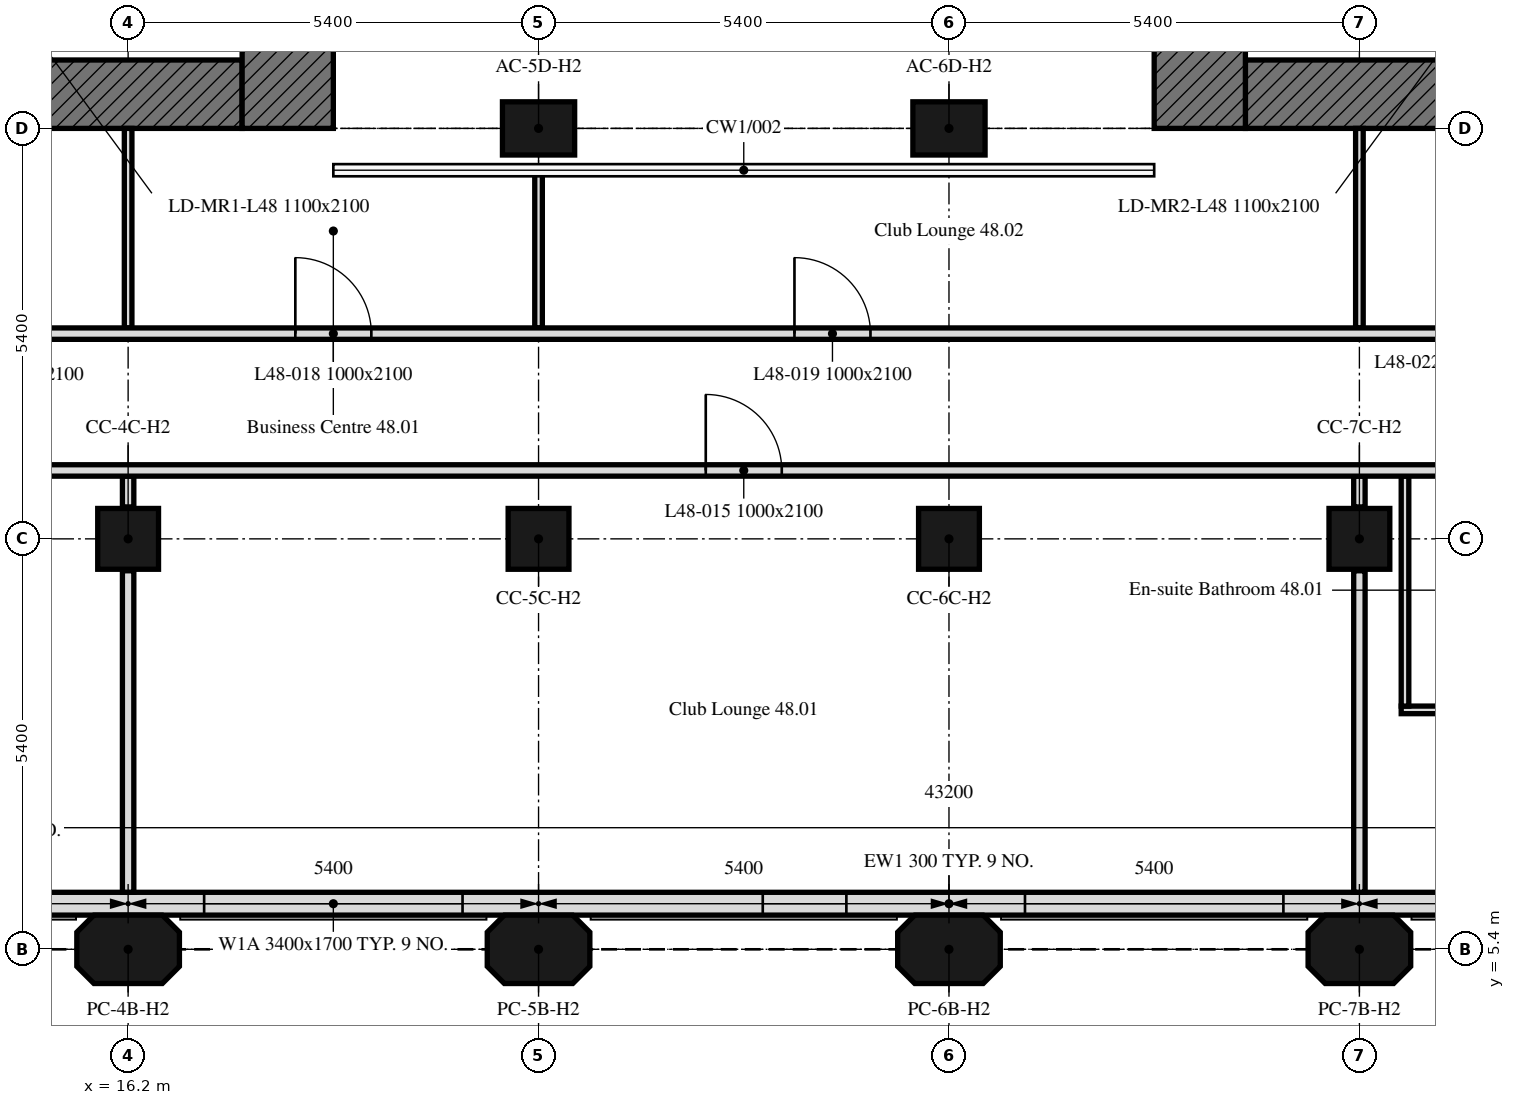
"""IFC4 building model, lengths in metres.
Left out: names, types, materials, properties, quantities, classifications, styles, units other than length and angle.
Written with IfcOpenShell. Run it as: python <this file> out.ifc"""

import sys

from ifc_helpers import new_model, si_unit, direction, frame, frame_2d, origin, origin_2d, place, context, subcontext, project, spatial, polyline, rectangle, outline, extrude, element, fill, save


model = new_model("IFC4")
c1 = context("Model", 3, precision=1e-05, world=origin(), true_north=direction((0.0, 1.0)))
c2 = subcontext(c1, "Body", "Model", "MODEL_VIEW")
j1 = project(units=[si_unit("LENGTHUNIT", "METRE"), si_unit("PLANEANGLEUNIT", "RADIAN")], contexts=[c1])
p1 = place(None, origin())
s1 = spatial("IfcSite", under=j1, at=p1, CompositionType="ELEMENT")
p2 = place(p1, origin())
s2 = spatial("IfcBuilding", under=s1, at=p2, CompositionType="ELEMENT")
p3 = place(p2, frame((0.0, 0.0, 197.2)))
s3 = spatial("IfcBuildingStorey", under=s2, at=p3, CompositionType="ELEMENT", Elevation=197.2)
for number, where, z_axis, x_axis in (
    (1, (16.2, 5.4, 0.0), (0.0, 0.0, 1.0), (1.0, 0.0, 0.0)),
    (2, (21.6, 5.4, 0.0), (0.0, 0.0, 1.0), (1.0, 0.0, 0.0)),
    (3, (27.0, 5.4, 0.0), (0.0, 0.0, 1.0), (1.0, 0.0, 0.0)),
    (4, (32.4, 5.4, 0.0), (0.0, 0.0, 1.0), (1.0, 0.0, 0.0)),
):
    element("IfcColumn", number, at=place(p3, frame(where, z_axis=z_axis, x_axis=x_axis)), inside=s3, PredefinedType="COLUMN", context=c2, shape_type="SweptSolid", body=[
        extrude(outline(polyline([(-0.45, -0.45), (0.45, -0.45), (0.675, -0.225), (0.675, 0.225), (0.45, 0.45), (-0.45, 0.45), (-0.675, 0.225), (-0.675, -0.225), (-0.45, -0.45)])), origin(), (0.0, 0.0, 1.0), 3.0),
    ])
for number, where, z_axis, x_axis in (
    (5, (16.2, 10.8, 0.0), (0.0, 0.0, 1.0), (1.0, 0.0, 0.0)),
    (6, (21.6, 10.8, 0.0), (0.0, 0.0, 1.0), (1.0, 0.0, 0.0)),
    (7, (27.0, 10.8, 0.0), (0.0, 0.0, 1.0), (1.0, 0.0, 0.0)),
    (8, (32.4, 10.8, 0.0), (0.0, 0.0, 1.0), (1.0, 0.0, 0.0)),
):
    element("IfcColumn", number, at=place(p3, frame(where, z_axis=z_axis, x_axis=x_axis)), inside=s3, PredefinedType="COLUMN", context=c2, shape_type="SweptSolid", body=[
        extrude(rectangle(XDim=0.8, YDim=0.8, at=origin_2d()), origin(), (0.0, 0.0, 1.0), 3.0),
    ])
for number, where, z_axis, x_axis in (
    (9, (21.6, 16.2, 0.0), (0.0, 0.0, 1.0), (1.0, 0.0, 0.0)),
    (10, (27.0, 16.2, 0.0), (0.0, 0.0, 1.0), (1.0, 0.0, 0.0)),
):
    element("IfcColumn", number, at=place(p3, frame(where, z_axis=z_axis, x_axis=x_axis)), inside=s3, PredefinedType="COLUMN", context=c2, shape_type="SweptSolid", body=[
        extrude(rectangle(XDim=0.95, YDim=0.7, at=origin_2d()), origin(), (0.0, 0.0, 1.0), 3.0),
    ])
p4 = place(p3, frame((10.986, 6.0, 0.0), z_axis=(0.0, 0.0, 1.0), x_axis=(1.0, 0.0, 0.0)))
e11 = element("IfcWall", 11, at=p4, inside=s3, PredefinedType="SOLIDWALL", context=c2, shape_type="SweptSolid", body=[
    extrude(rectangle(XDim=32.027, YDim=0.3, at=frame_2d((16.014, 0.0))), origin(), (0.0, 0.0, 1.0), 3.0),
])
p5 = place(p4, frame((2.764, 0.0, 0.9)))
e12 = element("IfcOpeningElement", 12, at=p5, cuts=e11, PredefinedType="OPENING", context=c2, shape_type="SweptSolid", body=[
    extrude(rectangle(XDim=1.1, YDim=1.7, at=frame_2d((0.55, 0.85))), frame((0.0, 0.16, 0.0), z_axis=(0.0, -1.0, 0.0), x_axis=(1.0, 0.0, 0.0)), (0.0, 0.0, 1.0), 0.32),
])
p6 = place(p4, frame((6.214, 0.0, 0.9)))
e13 = element("IfcOpeningElement", 13, at=p6, cuts=e11, PredefinedType="OPENING", context=c2, shape_type="SweptSolid", body=[
    extrude(rectangle(XDim=3.4, YDim=1.7, at=frame_2d((1.7, 0.85))), frame((0.0, 0.16, 0.0), z_axis=(0.0, -1.0, 0.0), x_axis=(1.0, 0.0, 0.0)), (0.0, 0.0, 1.0), 0.32),
])
p7 = place(p4, frame((13.564, 0.0, 0.9)))
e14 = element("IfcOpeningElement", 14, at=p7, cuts=e11, PredefinedType="OPENING", context=c2, shape_type="SweptSolid", body=[
    extrude(rectangle(XDim=1.1, YDim=1.7, at=frame_2d((0.55, 0.85))), frame((0.0, 0.16, 0.0), z_axis=(0.0, -1.0, 0.0), x_axis=(1.0, 0.0, 0.0)), (0.0, 0.0, 1.0), 0.32),
])
p8 = place(p4, frame((17.014, 0.0, 0.9)))
e15 = element("IfcOpeningElement", 15, at=p8, cuts=e11, PredefinedType="OPENING", context=c2, shape_type="SweptSolid", body=[
    extrude(rectangle(XDim=3.4, YDim=1.7, at=frame_2d((1.7, 0.85))), frame((0.0, 0.16, 0.0), z_axis=(0.0, -1.0, 0.0), x_axis=(1.0, 0.0, 0.0)), (0.0, 0.0, 1.0), 0.32),
])
p9 = place(p4, frame((24.364, 0.0, 0.9)))
e16 = element("IfcOpeningElement", 16, at=p9, cuts=e11, PredefinedType="OPENING", context=c2, shape_type="SweptSolid", body=[
    extrude(rectangle(XDim=1.1, YDim=1.7, at=frame_2d((0.55, 0.85))), frame((0.0, 0.16, 0.0), z_axis=(0.0, -1.0, 0.0), x_axis=(1.0, 0.0, 0.0)), (0.0, 0.0, 1.0), 0.32),
])
p10 = place(p4, frame((27.814, 0.0, 0.9)))
e17 = element("IfcOpeningElement", 17, at=p10, cuts=e11, PredefinedType="OPENING", context=c2, shape_type="SweptSolid", body=[
    extrude(rectangle(XDim=3.4, YDim=1.7, at=frame_2d((1.7, 0.85))), frame((0.0, 0.16, 0.0), z_axis=(0.0, -1.0, 0.0), x_axis=(1.0, 0.0, 0.0)), (0.0, 0.0, 1.0), 0.32),
])
p11 = place(p3, frame((17.7, 16.65, 0.0), z_axis=(0.0, 0.0, 1.0), x_axis=(-1.0, 0.0, 0.0)))
e18 = element("IfcWall", 18, at=p11, inside=s3, PredefinedType="SOLIDWALL", context=c2, shape_type="SweptSolid", body=[
    extrude(rectangle(XDim=11.1, YDim=0.9, at=frame_2d((5.55, 0.0))), origin(), (0.0, 0.0, 1.0), 3.0),
])
p12 = place(p11, frame((5.55, 0.0, 0.0)))
e19 = element("IfcOpeningElement", 19, at=p12, cuts=e18, PredefinedType="OPENING", context=c2, shape_type="SweptSolid", body=[
    extrude(rectangle(XDim=2.0, YDim=2.4, at=frame_2d((1.0, 1.2))), frame((0.0, 0.45, 0.0), z_axis=(0.0, -1.0, 0.0), x_axis=(1.0, 0.0, 0.0)), (0.0, 0.0, 1.0), 0.9),
])
p13 = place(p3, frame((18.3, 32.4, 0.0), z_axis=(0.0, 0.0, 1.0), x_axis=(0.0, -1.0, 0.0)))
e20 = element("IfcWall", 20, at=p13, inside=s3, PredefinedType="SOLIDWALL", context=c2, shape_type="SweptSolid", body=[
    extrude(rectangle(XDim=16.2, YDim=1.2, at=frame_2d((8.1, 0.0))), origin(), (0.0, 0.0, 1.0), 3.0),
])
p14 = place(p3, frame((42.0, 16.65, 0.0), z_axis=(0.0, 0.0, 1.0), x_axis=(-1.0, 0.0, 0.0)))
e21 = element("IfcWall", 21, at=p14, inside=s3, PredefinedType="SOLIDWALL", context=c2, shape_type="SweptSolid", body=[
    extrude(rectangle(XDim=11.1, YDim=0.9, at=frame_2d((5.55, 0.0))), origin(), (0.0, 0.0, 1.0), 3.0),
])
p15 = place(p14, frame((3.55, 0.0, 0.0)))
e22 = element("IfcOpeningElement", 22, at=p15, cuts=e21, PredefinedType="OPENING", context=c2, shape_type="SweptSolid", body=[
    extrude(rectangle(XDim=2.0, YDim=2.4, at=frame_2d((1.0, 1.2))), frame((0.0, 0.45, 0.0), z_axis=(0.0, -1.0, 0.0), x_axis=(1.0, 0.0, 0.0)), (0.0, 0.0, 1.0), 0.9),
])
p16 = place(p3, frame((30.3, 16.2, 0.0), z_axis=(0.0, 0.0, 1.0), x_axis=(0.0, 1.0, 0.0)))
e23 = element("IfcWall", 23, at=p16, inside=s3, PredefinedType="SOLIDWALL", context=c2, shape_type="SweptSolid", body=[
    extrude(rectangle(XDim=16.2, YDim=1.2, at=frame_2d((8.1, 0.0))), origin(), (0.0, 0.0, 1.0), 3.0),
])
p17 = place(p3, frame((16.2, 6.151, 0.0), z_axis=(0.0, 0.0, 1.0), x_axis=(0.0, 1.0, 0.0)))
e24 = element("IfcWall", 24, at=p17, inside=s3, PredefinedType="PARTITIONING", context=c2, shape_type="SweptSolid", body=[
    extrude(rectangle(XDim=4.229, YDim=0.15, at=frame_2d((2.115, 0.0))), origin(), (0.0, 0.0, 1.0), 3.0),
])
p18 = place(p3, frame((16.2, 11.22, 0.0), z_axis=(0.0, 0.0, 1.0), x_axis=(0.0, 1.0, 0.0)))
e25 = element("IfcWall", 25, at=p18, inside=s3, PredefinedType="PARTITIONING", context=c2, shape_type="SweptSolid", body=[
    extrude(rectangle(XDim=0.405, YDim=0.15, at=frame_2d((0.203, 0.0))), origin(), (0.0, 0.0, 1.0), 3.0),
])
p19 = place(p3, frame((32.4, 6.151, 0.0), z_axis=(0.0, 0.0, 1.0), x_axis=(0.0, 1.0, 0.0)))
e26 = element("IfcWall", 26, at=p19, inside=s3, PredefinedType="PARTITIONING", context=c2, shape_type="SweptSolid", body=[
    extrude(rectangle(XDim=4.229, YDim=0.15, at=frame_2d((2.115, 0.0))), origin(), (0.0, 0.0, 1.0), 3.0),
])
p20 = place(p3, frame((32.4, 11.22, 0.0), z_axis=(0.0, 0.0, 1.0), x_axis=(0.0, 1.0, 0.0)))
e27 = element("IfcWall", 27, at=p20, inside=s3, PredefinedType="PARTITIONING", context=c2, shape_type="SweptSolid", body=[
    extrude(rectangle(XDim=0.405, YDim=0.15, at=frame_2d((0.203, 0.0))), origin(), (0.0, 0.0, 1.0), 3.0),
])
p21 = place(p3, frame((35.05, 8.55, 0.0), z_axis=(0.0, 0.0, 1.0), x_axis=(-1.0, 0.0, 0.0)))
e28 = element("IfcWall", 28, at=p21, inside=s3, PredefinedType="PARTITIONING", context=c2, shape_type="SweptSolid", body=[
    extrude(rectangle(XDim=2.1, YDim=0.1, at=frame_2d((1.05, 0.0))), origin(), (0.0, 0.0, 1.0), 3.0),
])
p22 = place(p3, frame((33.0, 8.6, 0.0), z_axis=(0.0, 0.0, 1.0), x_axis=(0.0, 1.0, 0.0)))
e29 = element("IfcWall", 29, at=p22, inside=s3, PredefinedType="PARTITIONING", context=c2, shape_type="SweptSolid", body=[
    extrude(rectangle(XDim=3.025, YDim=0.1, at=frame_2d((1.512, 0.0))), origin(), (0.0, 0.0, 1.0), 3.0),
])
p23 = place(p3, frame((6.151, 11.7, 0.0), z_axis=(0.0, 0.0, 1.0), x_axis=(1.0, 0.0, 0.0)))
e30 = element("IfcWall", 30, at=p23, inside=s3, PredefinedType="PARTITIONING", context=c2, shape_type="SweptSolid", body=[
    extrude(rectangle(XDim=41.698, YDim=0.15, at=frame_2d((20.849, 0.0))), origin(), (0.0, 0.0, 1.0), 3.0),
])
p24 = place(p23, frame((17.649, 0.0, 0.0)))
e31 = element("IfcOpeningElement", 31, at=p24, cuts=e30, PredefinedType="OPENING", context=c2, shape_type="SweptSolid", body=[
    extrude(rectangle(XDim=1.0, YDim=2.1, at=frame_2d((0.5, 1.05))), frame((0.0, 0.075, 0.0), z_axis=(0.0, -1.0, 0.0), x_axis=(1.0, 0.0, 0.0)), (0.0, 0.0, 1.0), 0.15),
])
p25 = place(p23, frame((1.449, 0.0, 0.0)))
e32 = element("IfcOpeningElement", 32, at=p25, cuts=e30, PredefinedType="OPENING", context=c2, shape_type="SweptSolid", body=[
    extrude(rectangle(XDim=1.0, YDim=2.1, at=frame_2d((0.5, 1.05))), frame((0.0, 0.075, 0.0), z_axis=(0.0, -1.0, 0.0), x_axis=(1.0, 0.0, 0.0)), (0.0, 0.0, 1.0), 0.15),
])
p26 = place(p23, frame((29.249, 0.0, 0.0)))
e33 = element("IfcOpeningElement", 33, at=p26, cuts=e30, PredefinedType="OPENING", context=c2, shape_type="SweptSolid", body=[
    extrude(rectangle(XDim=1.0, YDim=2.1, at=frame_2d((0.5, 1.05))), frame((0.0, 0.075, 0.0), z_axis=(0.0, -1.0, 0.0), x_axis=(1.0, 0.0, 0.0)), (0.0, 0.0, 1.0), 0.15),
])
p27 = place(p23, frame((37.954, 0.0, 0.0)))
e34 = element("IfcOpeningElement", 34, at=p27, cuts=e30, PredefinedType="OPENING", context=c2, shape_type="SweptSolid", body=[
    extrude(rectangle(XDim=1.0, YDim=2.1, at=frame_2d((0.5, 1.05))), frame((0.0, 0.075, 0.0), z_axis=(0.0, -1.0, 0.0), x_axis=(1.0, 0.0, 0.0)), (0.0, 0.0, 1.0), 0.15),
])
p28 = place(p3, frame((16.2, 16.2, 0.0), z_axis=(0.0, 0.0, 1.0), x_axis=(0.0, -1.0, 0.0)))
e35 = element("IfcWall", 35, at=p28, inside=s3, PredefinedType="PARTITIONING", context=c2, shape_type="SweptSolid", body=[
    extrude(rectangle(XDim=2.625, YDim=0.1, at=frame_2d((1.312, 0.0))), origin(), (0.0, 0.0, 1.0), 3.0),
])
p29 = place(p3, frame((21.6, 13.575, 0.0), z_axis=(0.0, 0.0, 1.0), x_axis=(0.0, 1.0, 0.0)))
e36 = element("IfcWall", 36, at=p29, inside=s3, PredefinedType="PARTITIONING", context=c2, shape_type="SweptSolid", body=[
    extrude(rectangle(XDim=2.13, YDim=0.1, at=frame_2d((1.065, 0.0))), origin(), (0.0, 0.0, 1.0), 3.0),
])
p30 = place(p3, frame((32.4, 13.575, 0.0), z_axis=(0.0, 0.0, 1.0), x_axis=(0.0, 1.0, 0.0)))
e37 = element("IfcWall", 37, at=p30, inside=s3, PredefinedType="PARTITIONING", context=c2, shape_type="SweptSolid", body=[
    extrude(rectangle(XDim=2.625, YDim=0.1, at=frame_2d((1.312, 0.0))), origin(), (0.0, 0.0, 1.0), 3.0),
])
p31 = place(p3, frame((9.45, 13.5, 0.0), z_axis=(0.0, 0.0, 1.0), x_axis=(1.0, 0.0, 0.0)))
e38 = element("IfcWall", 38, at=p31, inside=s3, PredefinedType="PARTITIONING", context=c2, shape_type="SweptSolid", body=[
    extrude(rectangle(XDim=33.675, YDim=0.15, at=frame_2d((16.837, 0.0))), origin(), (0.0, 0.0, 1.0), 3.0),
])
p32 = place(p31, frame((8.95, 0.0, 0.0)))
e39 = element("IfcOpeningElement", 39, at=p32, cuts=e38, PredefinedType="OPENING", context=c2, shape_type="SweptSolid", body=[
    extrude(rectangle(XDim=1.0, YDim=2.1, at=frame_2d((0.5, 1.05))), frame((0.0, 0.075, 0.0), z_axis=(0.0, -1.0, 0.0), x_axis=(1.0, 0.0, 0.0)), (0.0, 0.0, 1.0), 0.15),
])
p33 = place(p31, frame((15.517, 0.0, 0.0)))
e40 = element("IfcOpeningElement", 40, at=p33, cuts=e38, PredefinedType="OPENING", context=c2, shape_type="SweptSolid", body=[
    extrude(rectangle(XDim=1.0, YDim=2.1, at=frame_2d((0.5, 1.05))), frame((0.0, 0.075, 0.0), z_axis=(0.0, -1.0, 0.0), x_axis=(1.0, 0.0, 0.0)), (0.0, 0.0, 1.0), 0.15),
])
p34 = place(p31, frame((24.075, 0.0, 0.0)))
e41 = element("IfcOpeningElement", 41, at=p34, cuts=e38, PredefinedType="OPENING", context=c2, shape_type="SweptSolid", body=[
    extrude(rectangle(XDim=1.0, YDim=2.1, at=frame_2d((0.5, 1.05))), frame((0.0, 0.075, 0.0), z_axis=(0.0, -1.0, 0.0), x_axis=(1.0, 0.0, 0.0)), (0.0, 0.0, 1.0), 0.15),
])
p35 = place(p31, frame((31.275, 0.0, 0.0)))
e42 = element("IfcOpeningElement", 42, at=p35, cuts=e38, PredefinedType="OPENING", context=c2, shape_type="SweptSolid", body=[
    extrude(rectangle(XDim=1.0, YDim=2.1, at=frame_2d((0.5, 1.05))), frame((0.0, 0.075, 0.0), z_axis=(0.0, -1.0, 0.0), x_axis=(1.0, 0.0, 0.0)), (0.0, 0.0, 1.0), 0.15),
])
p36 = place(p31, frame((4.625, 0.0, 0.0)))
e43 = element("IfcOpeningElement", 43, at=p36, cuts=e38, PredefinedType="OPENING", context=c2, shape_type="SweptSolid", body=[
    extrude(rectangle(XDim=1.0, YDim=2.1, at=frame_2d((0.5, 1.05))), frame((0.0, 0.075, 0.0), z_axis=(0.0, -1.0, 0.0), x_axis=(1.0, 0.0, 0.0)), (0.0, 0.0, 1.0), 0.15),
])
p37 = place(p31, frame((1.4, 0.0, 0.0)))
e44 = element("IfcOpeningElement", 44, at=p37, cuts=e38, PredefinedType="OPENING", context=c2, shape_type="SweptSolid", body=[
    extrude(rectangle(XDim=1.8, YDim=2.4, at=frame_2d((0.9, 1.2))), frame((0.0, 0.075, 0.0), z_axis=(0.0, -1.0, 0.0), x_axis=(1.0, 0.0, 0.0)), (0.0, 0.0, 1.0), 0.15),
])
p38 = place(p31, frame((26.5, 0.0, 0.0)))
e45 = element("IfcOpeningElement", 45, at=p38, cuts=e38, PredefinedType="OPENING", context=c2, shape_type="SweptSolid", body=[
    extrude(rectangle(XDim=1.8, YDim=2.4, at=frame_2d((0.9, 1.2))), frame((0.0, 0.075, 0.0), z_axis=(0.0, -1.0, 0.0), x_axis=(1.0, 0.0, 0.0)), (0.0, 0.0, 1.0), 0.15),
])
p39 = place(p6, origin())
e46 = element("IfcWindow", 46, at=p39, inside=s3, PartitioningType="SINGLE_PANEL", PredefinedType="WINDOW", context=c2, shape_type="SweptSolid", body=[
    extrude(rectangle(XDim=3.4, YDim=1.7, at=frame_2d((1.7, 0.85))), frame((0.0, 0.03, 0.0), z_axis=(0.0, -1.0, 0.0), x_axis=(1.0, 0.0, 0.0)), (0.0, 0.0, 1.0), 0.06),
])
fill(e13, e46)
p40 = place(p7, origin())
e47 = element("IfcWindow", 47, at=p40, inside=s3, PartitioningType="SINGLE_PANEL", PredefinedType="WINDOW", context=c2, shape_type="SweptSolid", body=[
    extrude(rectangle(XDim=1.1, YDim=1.7, at=frame_2d((0.55, 0.85))), frame((0.0, 0.03, 0.0), z_axis=(0.0, -1.0, 0.0), x_axis=(1.0, 0.0, 0.0)), (0.0, 0.0, 1.0), 0.06),
])
fill(e14, e47)
p41 = place(p8, origin())
e48 = element("IfcWindow", 48, at=p41, inside=s3, PartitioningType="SINGLE_PANEL", PredefinedType="WINDOW", context=c2, shape_type="SweptSolid", body=[
    extrude(rectangle(XDim=3.4, YDim=1.7, at=frame_2d((1.7, 0.85))), frame((0.0, 0.03, 0.0), z_axis=(0.0, -1.0, 0.0), x_axis=(1.0, 0.0, 0.0)), (0.0, 0.0, 1.0), 0.06),
])
fill(e15, e48)
p42 = place(p24, origin())
e49 = element("IfcDoor", 49, at=p42, inside=s3, OperationType="SINGLE_SWING_RIGHT", PredefinedType="DOOR", context=c2, shape_type="SweptSolid", body=[
    extrude(rectangle(XDim=1.0, YDim=2.1, at=frame_2d((0.5, 1.05))), frame((0.0, 0.025, 0.0), z_axis=(0.0, -1.0, 0.0), x_axis=(1.0, 0.0, 0.0)), (0.0, 0.0, 1.0), 0.05),
])
fill(e31, e49)
p43 = place(p32, origin())
e50 = element("IfcDoor", 50, at=p43, inside=s3, OperationType="SINGLE_SWING_LEFT", PredefinedType="DOOR", context=c2, shape_type="SweptSolid", body=[
    extrude(rectangle(XDim=1.0, YDim=2.1, at=frame_2d((0.5, 1.05))), frame((0.0, 0.025, 0.0), z_axis=(0.0, -1.0, 0.0), x_axis=(1.0, 0.0, 0.0)), (0.0, 0.0, 1.0), 0.05),
])
fill(e39, e50)
p44 = place(p33, origin())
e51 = element("IfcDoor", 51, at=p44, inside=s3, OperationType="SINGLE_SWING_LEFT", PredefinedType="DOOR", context=c2, shape_type="SweptSolid", body=[
    extrude(rectangle(XDim=1.0, YDim=2.1, at=frame_2d((0.5, 1.05))), frame((0.0, 0.025, 0.0), z_axis=(0.0, -1.0, 0.0), x_axis=(1.0, 0.0, 0.0)), (0.0, 0.0, 1.0), 0.05),
])
fill(e40, e51)
save(model, sys.argv[1])
